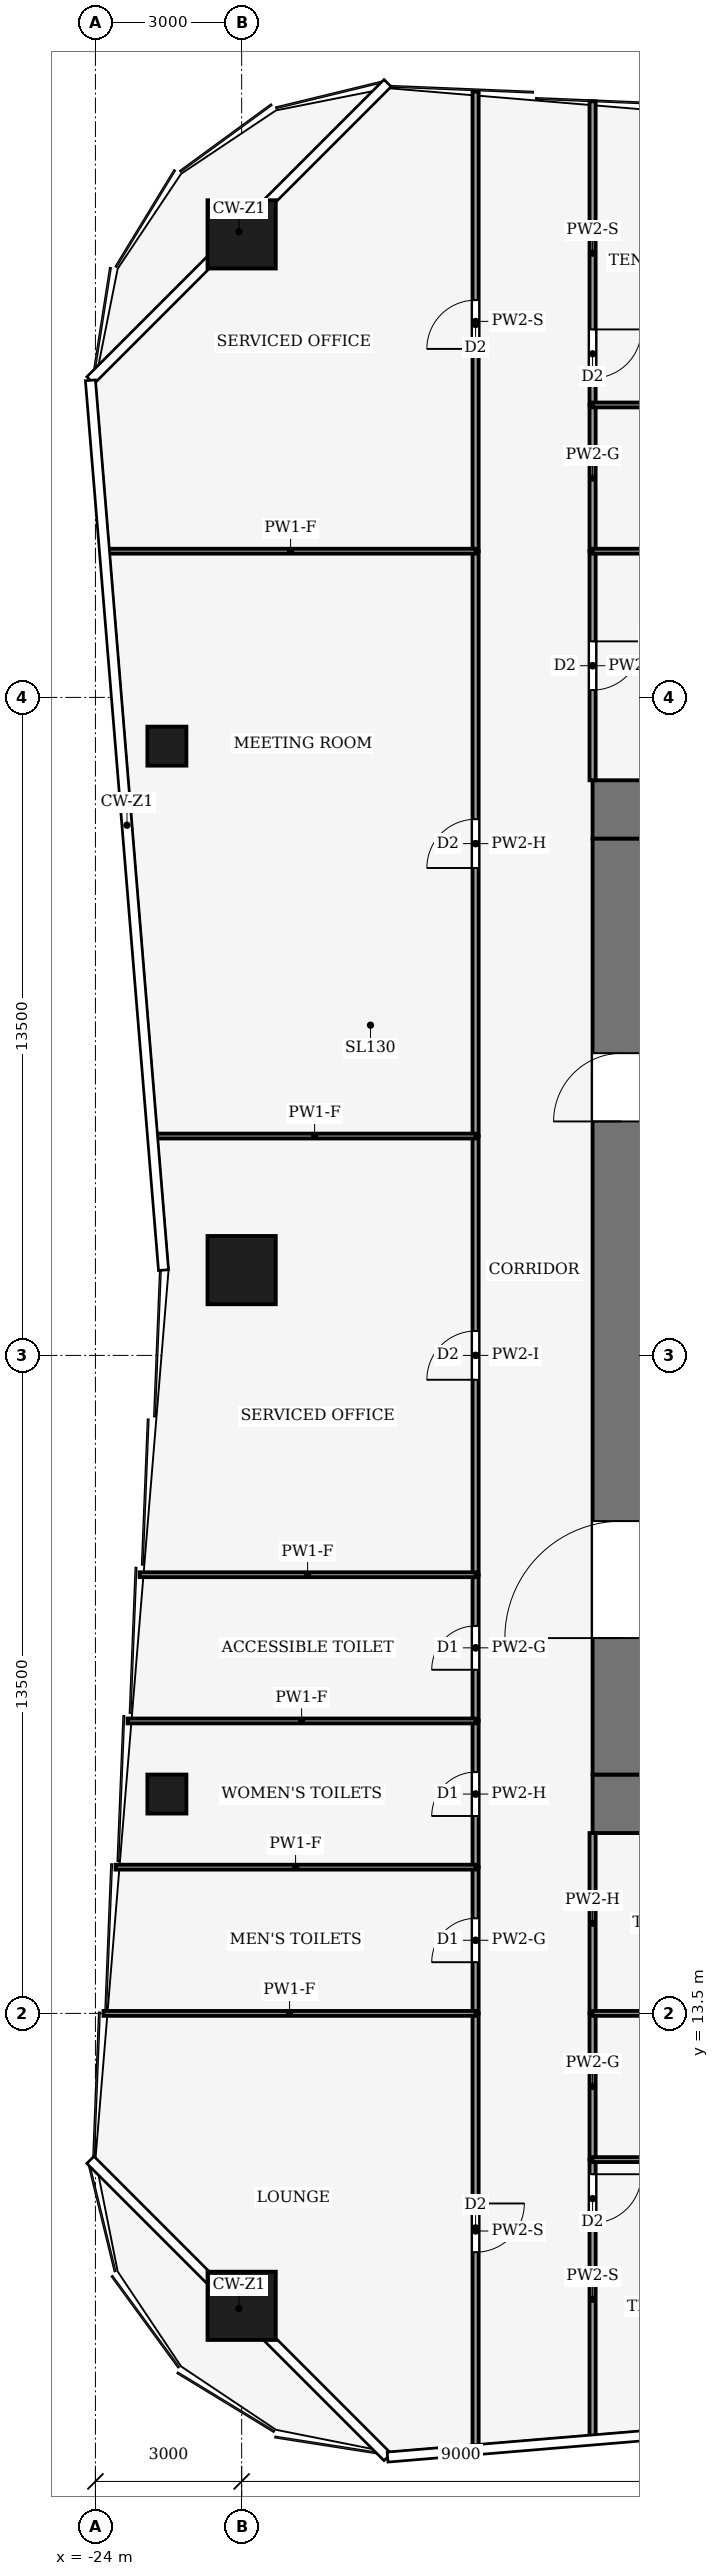
"""IFC4 building model, lengths in metres.
Left out: names, types, materials, properties, quantities, classifications, styles, units other than length and angle.
Written with IfcOpenShell. Run it as: python <this file> out.ifc"""

import sys

from ifc_helpers import new_model, si_unit, direction, frame, frame_2d, origin, origin_2d, place, context, subcontext, project, spatial, rectangle, hollow_rectangle, extrude, element, fill, save


model = new_model("IFC4")
c1 = context("Model", 3, precision=1e-05, world=origin(), true_north=direction((0.0, 1.0)))
c2 = subcontext(c1, "Body", "Model", "MODEL_VIEW")
j1 = project(units=[si_unit("LENGTHUNIT", "METRE"), si_unit("PLANEANGLEUNIT", "RADIAN")], contexts=[c1])
p1 = place(None, origin())
s1 = spatial("IfcSite", under=j1, at=p1, CompositionType="ELEMENT")
p2 = place(p1, origin())
s2 = spatial("IfcBuilding", under=s1, at=p2, CompositionType="ELEMENT")
p3 = place(p2, frame((0.0, 0.0, 98.0)))
s3 = spatial("IfcBuildingStorey", under=s2, at=p3, CompositionType="ELEMENT", Elevation=98.0)
for number, where, z_axis, x_axis in (
    (1, (-13.8, 17.8, -0.13), (0.0, 0.0, 1.0), (1.0, 0.0, 0.0)),
    (2, (-13.8, 38.2, -0.13), (0.0, 0.0, 1.0), (1.0, 0.0, 0.0)),
):
    element("IfcWall", number, at=place(p3, frame(where, z_axis=z_axis, x_axis=x_axis)), inside=s3, PredefinedType="SHEAR", context=c2, shape_type="SweptSolid", body=[
        extrude(rectangle(XDim=27.6, YDim=1.2, at=frame_2d((13.8, 0.0))), origin(), (0.0, 0.0, 1.0), 4.0),
    ])
p4 = place(p3, frame((-13.2, 18.4, -0.13), z_axis=(0.0, 0.0, 1.0), x_axis=(0.0, 1.0, 0.0)))
e3 = element("IfcWall", 3, at=p4, inside=s3, PredefinedType="SHEAR", context=c2, shape_type="SweptSolid", body=[
    extrude(rectangle(XDim=19.2, YDim=1.2, at=frame_2d((9.6, 0.0))), origin(), (0.0, 0.0, 1.0), 4.0),
])
p5 = place(p4, frame((2.8, 0.0, 0.13)))
e4 = element("IfcOpeningElement", 4, at=p5, cuts=e3, PredefinedType="OPENING", context=c2, shape_type="SweptSolid", body=[
    extrude(rectangle(XDim=2.4, YDim=2.4, at=frame_2d((1.2, 1.2))), frame((0.0, 0.61, 0.0), z_axis=(0.0, -1.0, 0.0), x_axis=(1.0, 0.0, 0.0)), (0.0, 0.0, 1.0), 1.22),
])
p6 = place(p4, frame((13.4, 0.0, 0.13)))
e5 = element("IfcOpeningElement", 5, at=p6, cuts=e3, PredefinedType="OPENING", context=c2, shape_type="SweptSolid", body=[
    extrude(rectangle(XDim=1.4, YDim=2.2, at=frame_2d((0.7, 1.1))), frame((0.0, 0.61, 0.0), z_axis=(0.0, -1.0, 0.0), x_axis=(1.0, 0.0, 0.0)), (0.0, 0.0, 1.0), 1.22),
])
for number, where, z_axis, x_axis in (
    (6, (-21.0, 50.0, 0.0), (0.0, 0.0, 1.0), (1.0, 0.0, 0.0)),
    (7, (-21.0, 7.5, 0.0), (0.0, 0.0, 1.0), (1.0, 0.0, 0.0)),
    (8, (-21.0, 28.75, 0.0), (0.0, 0.0, 1.0), (1.0, 0.0, 0.0)),
):
    element("IfcColumn", number, at=place(p3, frame(where, z_axis=z_axis, x_axis=x_axis)), inside=s3, PredefinedType="COLUMN", context=c2, shape_type="SweptSolid", body=[
        extrude(hollow_rectangle(XDim=1.4, YDim=1.4, WallThickness=0.08, at=origin_2d()), origin(), (0.0, 0.0, 1.0), 4.0),
    ])
for number, where, z_axis, x_axis in (
    (9, (-22.534, 18.0, 0.0), (0.0, 0.0, 1.0), (1.0, 0.0, 0.0)),
    (10, (-22.534, 39.5, 0.0), (0.0, 0.0, 1.0), (1.0, 0.0, 0.0)),
):
    element("IfcColumn", number, at=place(p3, frame(where, z_axis=z_axis, x_axis=x_axis)), inside=s3, PredefinedType="COLUMN", context=c2, shape_type="SweptSolid", body=[
        extrude(hollow_rectangle(XDim=0.8, YDim=0.8, WallThickness=0.04, at=origin_2d()), origin(), (0.0, 0.0, 1.0), 4.0),
    ])
p7 = place(p3, frame((-16.2, 13.5, 0.0), z_axis=(0.0, 0.0, 1.0), x_axis=(0.0, -1.0, 0.0)))
e11 = element("IfcWall", 11, at=p7, inside=s3, PredefinedType="PARTITIONING", context=c2, shape_type="SweptSolid", body=[
    extrude(rectangle(XDim=8.93, YDim=0.125, at=frame_2d((4.465, 0.0))), origin(), (0.0, 0.0, 1.0), 3.04),
])
p8 = place(p7, frame((3.9, 0.0, 0.0)))
e12 = element("IfcOpeningElement", 12, at=p8, cuts=e11, PredefinedType="OPENING", context=c2, shape_type="SweptSolid", body=[
    extrude(rectangle(XDim=1.0, YDim=2.1, at=frame_2d((0.5, 1.05))), frame((0.0, 0.073, 0.0), z_axis=(0.0, -1.0, 0.0), x_axis=(1.0, 0.0, 0.0)), (0.0, 0.0, 1.0), 0.145),
])
p9 = place(p3, frame((-16.2, 13.5, 0.0), z_axis=(0.0, 0.0, 1.0), x_axis=(0.0, 1.0, 0.0)))
e13 = element("IfcWall", 13, at=p9, inside=s3, PredefinedType="PARTITIONING", context=c2, shape_type="SweptSolid", body=[
    extrude(rectangle(XDim=3.0, YDim=0.125, at=frame_2d((1.5, 0.0))), origin(), (0.0, 0.0, 1.0), 3.87),
])
p10 = place(p9, frame((1.05, 0.0, 0.0)))
e14 = element("IfcOpeningElement", 14, at=p10, cuts=e13, PredefinedType="OPENING", context=c2, shape_type="SweptSolid", body=[
    extrude(rectangle(XDim=0.9, YDim=2.1, at=frame_2d((0.45, 1.05))), frame((0.0, 0.073, 0.0), z_axis=(0.0, -1.0, 0.0), x_axis=(1.0, 0.0, 0.0)), (0.0, 0.0, 1.0), 0.145),
])
p11 = place(p3, frame((-16.2, 16.5, 0.0), z_axis=(0.0, 0.0, 1.0), x_axis=(0.0, 1.0, 0.0)))
e15 = element("IfcWall", 15, at=p11, inside=s3, PredefinedType="PARTITIONING", context=c2, shape_type="SweptSolid", body=[
    extrude(rectangle(XDim=3.0, YDim=0.125, at=frame_2d((1.5, 0.0))), origin(), (0.0, 0.0, 1.0), 3.14),
])
p12 = place(p11, frame((1.05, 0.0, 0.0)))
e16 = element("IfcOpeningElement", 16, at=p12, cuts=e15, PredefinedType="OPENING", context=c2, shape_type="SweptSolid", body=[
    extrude(rectangle(XDim=0.9, YDim=2.1, at=frame_2d((0.45, 1.05))), frame((0.0, 0.073, 0.0), z_axis=(0.0, -1.0, 0.0), x_axis=(1.0, 0.0, 0.0)), (0.0, 0.0, 1.0), 0.145),
])
p13 = place(p3, frame((-16.2, 19.5, 0.0), z_axis=(0.0, 0.0, 1.0), x_axis=(0.0, 1.0, 0.0)))
e17 = element("IfcWall", 17, at=p13, inside=s3, PredefinedType="PARTITIONING", context=c2, shape_type="SweptSolid", body=[
    extrude(rectangle(XDim=3.0, YDim=0.125, at=frame_2d((1.5, 0.0))), origin(), (0.0, 0.0, 1.0), 3.87),
])
p14 = place(p13, frame((1.05, 0.0, 0.0)))
e18 = element("IfcOpeningElement", 18, at=p14, cuts=e17, PredefinedType="OPENING", context=c2, shape_type="SweptSolid", body=[
    extrude(rectangle(XDim=0.9, YDim=2.1, at=frame_2d((0.45, 1.05))), frame((0.0, 0.073, 0.0), z_axis=(0.0, -1.0, 0.0), x_axis=(1.0, 0.0, 0.0)), (0.0, 0.0, 1.0), 0.145),
])
p15 = place(p3, frame((-16.2, 22.5, 0.0), z_axis=(0.0, 0.0, 1.0), x_axis=(0.0, 1.0, 0.0)))
e19 = element("IfcWall", 19, at=p15, inside=s3, PredefinedType="PARTITIONING", context=c2, shape_type="SweptSolid", body=[
    extrude(rectangle(XDim=9.0, YDim=0.125, at=frame_2d((4.5, 0.0))), origin(), (0.0, 0.0, 1.0), 3.48),
])
p16 = place(p15, frame((4.0, 0.0, 0.0)))
e20 = element("IfcOpeningElement", 20, at=p16, cuts=e19, PredefinedType="OPENING", context=c2, shape_type="SweptSolid", body=[
    extrude(rectangle(XDim=1.0, YDim=2.1, at=frame_2d((0.5, 1.05))), frame((0.0, 0.073, 0.0), z_axis=(0.0, -1.0, 0.0), x_axis=(1.0, 0.0, 0.0)), (0.0, 0.0, 1.0), 0.145),
])
p17 = place(p3, frame((-16.2, 31.5, 0.0), z_axis=(0.0, 0.0, 1.0), x_axis=(0.0, 1.0, 0.0)))
e21 = element("IfcWall", 21, at=p17, inside=s3, PredefinedType="PARTITIONING", context=c2, shape_type="SweptSolid", body=[
    extrude(rectangle(XDim=12.0, YDim=0.125, at=frame_2d((6.0, 0.0))), origin(), (0.0, 0.0, 1.0), 3.14),
])
p18 = place(p17, frame((5.5, 0.0, 0.0)))
e22 = element("IfcOpeningElement", 22, at=p18, cuts=e21, PredefinedType="OPENING", context=c2, shape_type="SweptSolid", body=[
    extrude(rectangle(XDim=1.0, YDim=2.1, at=frame_2d((0.5, 1.05))), frame((0.0, 0.073, 0.0), z_axis=(0.0, -1.0, 0.0), x_axis=(1.0, 0.0, 0.0)), (0.0, 0.0, 1.0), 0.145),
])
p19 = place(p3, frame((-16.2, 43.5, 0.0), z_axis=(0.0, 0.0, 1.0), x_axis=(0.0, 1.0, 0.0)))
e23 = element("IfcWall", 23, at=p19, inside=s3, PredefinedType="PARTITIONING", context=c2, shape_type="SweptSolid", body=[
    extrude(rectangle(XDim=9.43, YDim=0.125, at=frame_2d((4.715, 0.0))), origin(), (0.0, 0.0, 1.0), 3.04),
])
p20 = place(p19, frame((4.15, 0.0, 0.0)))
e24 = element("IfcOpeningElement", 24, at=p20, cuts=e23, PredefinedType="OPENING", context=c2, shape_type="SweptSolid", body=[
    extrude(rectangle(XDim=1.0, YDim=2.1, at=frame_2d((0.5, 1.05))), frame((0.0, 0.073, 0.0), z_axis=(0.0, -1.0, 0.0), x_axis=(1.0, 0.0, 0.0)), (0.0, 0.0, 1.0), 0.145),
])
p21 = place(p3, frame((-13.8, 10.5, 0.0), z_axis=(0.0, 0.0, 1.0), x_axis=(0.0, -1.0, 0.0)))
e25 = element("IfcWall", 25, at=p21, inside=s3, PredefinedType="PARTITIONING", context=c2, shape_type="SweptSolid", body=[
    extrude(rectangle(XDim=5.73, YDim=0.125, at=frame_2d((2.865, 0.0))), origin(), (0.0, 0.0, 1.0), 3.04),
])
p22 = place(p21, frame((0.3, 0.0, 0.0)))
e26 = element("IfcOpeningElement", 26, at=p22, cuts=e25, PredefinedType="OPENING", context=c2, shape_type="SweptSolid", body=[
    extrude(rectangle(XDim=1.0, YDim=2.1, at=frame_2d((0.5, 1.05))), frame((0.0, 0.073, 0.0), z_axis=(0.0, -1.0, 0.0), x_axis=(1.0, 0.0, 0.0)), (0.0, 0.0, 1.0), 0.145),
])
p23 = place(p3, frame((-13.8, 10.5, 0.0), z_axis=(0.0, 0.0, 1.0), x_axis=(0.0, 1.0, 0.0)))
e27 = element("IfcWall", 27, at=p23, inside=s3, PredefinedType="PARTITIONING", context=c2, shape_type="SweptSolid", body=[
    extrude(rectangle(XDim=3.0, YDim=0.125, at=frame_2d((1.5, 0.0))), origin(), (0.0, 0.0, 1.0), 3.87),
])
p24 = place(p3, frame((-13.8, 13.5, 0.0), z_axis=(0.0, 0.0, 1.0), x_axis=(0.0, 1.0, 0.0)))
e28 = element("IfcWall", 28, at=p24, inside=s3, PredefinedType="PARTITIONING", context=c2, shape_type="SweptSolid", body=[
    extrude(rectangle(XDim=3.7, YDim=0.125, at=frame_2d((1.85, 0.0))), origin(), (0.0, 0.0, 1.0), 3.14),
])
p25 = place(p3, frame((-13.8, 43.5, 0.0), z_axis=(0.0, 0.0, 1.0), x_axis=(0.0, -1.0, 0.0)))
e29 = element("IfcWall", 29, at=p25, inside=s3, PredefinedType="PARTITIONING", context=c2, shape_type="SweptSolid", body=[
    extrude(rectangle(XDim=4.7, YDim=0.125, at=frame_2d((2.35, 0.0))), origin(), (0.0, 0.0, 1.0), 3.14),
])
p26 = place(p25, frame((1.85, 0.0, 0.0)))
e30 = element("IfcOpeningElement", 30, at=p26, cuts=e29, PredefinedType="OPENING", context=c2, shape_type="SweptSolid", body=[
    extrude(rectangle(XDim=1.0, YDim=2.1, at=frame_2d((0.5, 1.05))), frame((0.0, 0.073, 0.0), z_axis=(0.0, -1.0, 0.0), x_axis=(1.0, 0.0, 0.0)), (0.0, 0.0, 1.0), 0.145),
])
p27 = place(p3, frame((-13.8, 43.5, 0.0), z_axis=(0.0, 0.0, 1.0), x_axis=(0.0, 1.0, 0.0)))
e31 = element("IfcWall", 31, at=p27, inside=s3, PredefinedType="PARTITIONING", context=c2, shape_type="SweptSolid", body=[
    extrude(rectangle(XDim=3.0, YDim=0.125, at=frame_2d((1.5, 0.0))), origin(), (0.0, 0.0, 1.0), 3.87),
])
p28 = place(p3, frame((-13.8, 52.73, 0.0), z_axis=(0.0, 0.0, 1.0), x_axis=(0.0, -1.0, 0.0)))
e32 = element("IfcWall", 32, at=p28, inside=s3, PredefinedType="PARTITIONING", context=c2, shape_type="SweptSolid", body=[
    extrude(rectangle(XDim=6.23, YDim=0.125, at=frame_2d((3.115, 0.0))), origin(), (0.0, 0.0, 1.0), 3.04),
])
p29 = place(p28, frame((4.68, 0.0, 0.0)))
e33 = element("IfcOpeningElement", 33, at=p29, cuts=e32, PredefinedType="OPENING", context=c2, shape_type="SweptSolid", body=[
    extrude(rectangle(XDim=1.0, YDim=2.1, at=frame_2d((0.5, 1.05))), frame((0.0, 0.073, 0.0), z_axis=(0.0, -1.0, 0.0), x_axis=(1.0, 0.0, 0.0)), (0.0, 0.0, 1.0), 0.145),
])
p30 = place(p3, frame((-16.2, 13.5, 0.0), z_axis=(0.0, 0.0, 1.0), x_axis=(-1.0, 0.0, 0.0)))
e34 = element("IfcWall", 34, at=p30, inside=s3, PredefinedType="PARTITIONING", context=c2, shape_type="SweptSolid", body=[
    extrude(rectangle(XDim=7.634, YDim=0.1, at=frame_2d((3.817, 0.0))), origin(), (0.0, 0.0, 1.0), 3.04),
])
p31 = place(p3, frame((-16.2, 16.5, 0.0), z_axis=(0.0, 0.0, 1.0), x_axis=(-1.0, 0.0, 0.0)))
e35 = element("IfcWall", 35, at=p31, inside=s3, PredefinedType="PARTITIONING", context=c2, shape_type="SweptSolid", body=[
    extrude(rectangle(XDim=7.387, YDim=0.1, at=frame_2d((3.693, 0.0))), origin(), (0.0, 0.0, 1.0), 3.04),
])
p32 = place(p3, frame((-16.2, 19.5, 0.0), z_axis=(0.0, 0.0, 1.0), x_axis=(-1.0, 0.0, 0.0)))
e36 = element("IfcWall", 36, at=p32, inside=s3, PredefinedType="PARTITIONING", context=c2, shape_type="SweptSolid", body=[
    extrude(rectangle(XDim=7.14, YDim=0.1, at=frame_2d((3.57, 0.0))), origin(), (0.0, 0.0, 1.0), 3.04),
])
p33 = place(p3, frame((-16.2, 22.5, 0.0), z_axis=(0.0, 0.0, 1.0), x_axis=(-1.0, 0.0, 0.0)))
e37 = element("IfcWall", 37, at=p33, inside=s3, PredefinedType="PARTITIONING", context=c2, shape_type="SweptSolid", body=[
    extrude(rectangle(XDim=6.894, YDim=0.1, at=frame_2d((3.447, 0.0))), origin(), (0.0, 0.0, 1.0), 3.04),
])
p34 = place(p3, frame((-16.2, 31.5, 0.0), z_axis=(0.0, 0.0, 1.0), x_axis=(-1.0, 0.0, 0.0)))
e38 = element("IfcWall", 38, at=p34, inside=s3, PredefinedType="PARTITIONING", context=c2, shape_type="SweptSolid", body=[
    extrude(rectangle(XDim=6.606, YDim=0.1, at=frame_2d((3.303, 0.0))), origin(), (0.0, 0.0, 1.0), 3.04),
])
p35 = place(p3, frame((-16.2, 43.5, 0.0), z_axis=(0.0, 0.0, 1.0), x_axis=(-1.0, 0.0, 0.0)))
e39 = element("IfcWall", 39, at=p35, inside=s3, PredefinedType="PARTITIONING", context=c2, shape_type="SweptSolid", body=[
    extrude(rectangle(XDim=7.592, YDim=0.1, at=frame_2d((3.796, 0.0))), origin(), (0.0, 0.0, 1.0), 3.04),
])
p36 = place(p3, frame((-13.8, 10.5, 0.0), z_axis=(0.0, 0.0, 1.0), x_axis=(1.0, 0.0, 0.0)))
e40 = element("IfcWall", 40, at=p36, inside=s3, PredefinedType="PARTITIONING", context=c2, shape_type="SweptSolid", body=[
    extrude(rectangle(XDim=6.3, YDim=0.1, at=frame_2d((3.15, 0.0))), origin(), (0.0, 0.0, 1.0), 3.39),
])
p37 = place(p36, frame((2.65, 0.0, 0.0)))
e41 = element("IfcOpeningElement", 41, at=p37, cuts=e40, PredefinedType="OPENING", context=c2, shape_type="SweptSolid", body=[
    extrude(rectangle(XDim=1.0, YDim=2.1, at=frame_2d((0.5, 1.05))), frame((0.0, 0.06, 0.0), z_axis=(0.0, -1.0, 0.0), x_axis=(1.0, 0.0, 0.0)), (0.0, 0.0, 1.0), 0.12),
])
p38 = place(p3, frame((-13.8, 13.5, 0.0), z_axis=(0.0, 0.0, 1.0), x_axis=(1.0, 0.0, 0.0)))
e42 = element("IfcWall", 42, at=p38, inside=s3, PredefinedType="PARTITIONING", context=c2, shape_type="SweptSolid", body=[
    extrude(rectangle(XDim=6.3, YDim=0.1, at=frame_2d((3.15, 0.0))), origin(), (0.0, 0.0, 1.0), 3.39),
])
p39 = place(p38, frame((2.65, 0.0, 0.0)))
e43 = element("IfcOpeningElement", 43, at=p39, cuts=e42, PredefinedType="OPENING", context=c2, shape_type="SweptSolid", body=[
    extrude(rectangle(XDim=1.0, YDim=2.1, at=frame_2d((0.5, 1.05))), frame((0.0, 0.06, 0.0), z_axis=(0.0, -1.0, 0.0), x_axis=(1.0, 0.0, 0.0)), (0.0, 0.0, 1.0), 0.12),
])
p40 = place(p3, frame((-13.8, 43.5, 0.0), z_axis=(0.0, 0.0, 1.0), x_axis=(1.0, 0.0, 0.0)))
e44 = element("IfcWall", 44, at=p40, inside=s3, PredefinedType="PARTITIONING", context=c2, shape_type="SweptSolid", body=[
    extrude(rectangle(XDim=6.3, YDim=0.1, at=frame_2d((3.15, 0.0))), origin(), (0.0, 0.0, 1.0), 3.39),
])
p41 = place(p40, frame((2.65, 0.0, 0.0)))
e45 = element("IfcOpeningElement", 45, at=p41, cuts=e44, PredefinedType="OPENING", context=c2, shape_type="SweptSolid", body=[
    extrude(rectangle(XDim=1.0, YDim=2.1, at=frame_2d((0.5, 1.05))), frame((0.0, 0.06, 0.0), z_axis=(0.0, -1.0, 0.0), x_axis=(1.0, 0.0, 0.0)), (0.0, 0.0, 1.0), 0.12),
])
p42 = place(p3, frame((-7.5, 46.5, 0.0), z_axis=(0.0, 0.0, 1.0), x_axis=(-1.0, 0.0, 0.0)))
e46 = element("IfcWall", 46, at=p42, inside=s3, PredefinedType="PARTITIONING", context=c2, shape_type="SweptSolid", body=[
    extrude(rectangle(XDim=6.3, YDim=0.1, at=frame_2d((3.15, 0.0))), origin(), (0.0, 0.0, 1.0), 3.39),
])
p43 = place(p5, origin())
e47 = element("IfcDoor", 47, at=p43, inside=s3, OperationType="DOUBLE_DOOR_SINGLE_SWING", PredefinedType="DOOR", context=c2, shape_type="SweptSolid", body=[
    extrude(rectangle(XDim=2.4, YDim=2.4, at=frame_2d((1.2, 1.2))), frame((0.0, 0.025, 0.0), z_axis=(0.0, -1.0, 0.0), x_axis=(1.0, 0.0, 0.0)), (0.0, 0.0, 1.0), 0.05),
])
fill(e4, e47)
p44 = place(p6, origin())
e48 = element("IfcDoor", 48, at=p44, inside=s3, OperationType="SINGLE_SWING_RIGHT", PredefinedType="DOOR", context=c2, shape_type="SweptSolid", body=[
    extrude(rectangle(XDim=1.4, YDim=2.2, at=frame_2d((0.7, 1.1))), frame((0.0, 0.025, 0.0), z_axis=(0.0, -1.0, 0.0), x_axis=(1.0, 0.0, 0.0)), (0.0, 0.0, 1.0), 0.05),
])
fill(e5, e48)
p45 = place(p8, origin())
e49 = element("IfcDoor", 49, at=p45, inside=s3, OperationType="SINGLE_SWING_LEFT", PredefinedType="DOOR", context=c2, shape_type="SweptSolid", body=[
    extrude(rectangle(XDim=1.0, YDim=2.1, at=frame_2d((0.5, 1.05))), frame((0.0, 0.025, 0.0), z_axis=(0.0, -1.0, 0.0), x_axis=(1.0, 0.0, 0.0)), (0.0, 0.0, 1.0), 0.05),
])
fill(e12, e49)
p46 = place(p10, origin())
e50 = element("IfcDoor", 50, at=p46, inside=s3, OperationType="SINGLE_SWING_RIGHT", PredefinedType="DOOR", context=c2, shape_type="SweptSolid", body=[
    extrude(rectangle(XDim=0.9, YDim=2.1, at=frame_2d((0.45, 1.05))), frame((0.0, 0.025, 0.0), z_axis=(0.0, -1.0, 0.0), x_axis=(1.0, 0.0, 0.0)), (0.0, 0.0, 1.0), 0.05),
])
fill(e14, e50)
p47 = place(p12, origin())
e51 = element("IfcDoor", 51, at=p47, inside=s3, OperationType="SINGLE_SWING_LEFT", PredefinedType="DOOR", context=c2, shape_type="SweptSolid", body=[
    extrude(rectangle(XDim=0.9, YDim=2.1, at=frame_2d((0.45, 1.05))), frame((0.0, 0.025, 0.0), z_axis=(0.0, -1.0, 0.0), x_axis=(1.0, 0.0, 0.0)), (0.0, 0.0, 1.0), 0.05),
])
fill(e16, e51)
p48 = place(p14, origin())
e52 = element("IfcDoor", 52, at=p48, inside=s3, OperationType="SINGLE_SWING_RIGHT", PredefinedType="DOOR", context=c2, shape_type="SweptSolid", body=[
    extrude(rectangle(XDim=0.9, YDim=2.1, at=frame_2d((0.45, 1.05))), frame((0.0, 0.025, 0.0), z_axis=(0.0, -1.0, 0.0), x_axis=(1.0, 0.0, 0.0)), (0.0, 0.0, 1.0), 0.05),
])
fill(e18, e52)
p49 = place(p16, origin())
e53 = element("IfcDoor", 53, at=p49, inside=s3, OperationType="SINGLE_SWING_LEFT", PredefinedType="DOOR", context=c2, shape_type="SweptSolid", body=[
    extrude(rectangle(XDim=1.0, YDim=2.1, at=frame_2d((0.5, 1.05))), frame((0.0, 0.025, 0.0), z_axis=(0.0, -1.0, 0.0), x_axis=(1.0, 0.0, 0.0)), (0.0, 0.0, 1.0), 0.05),
])
fill(e20, e53)
p50 = place(p18, origin())
e54 = element("IfcDoor", 54, at=p50, inside=s3, OperationType="SINGLE_SWING_RIGHT", PredefinedType="DOOR", context=c2, shape_type="SweptSolid", body=[
    extrude(rectangle(XDim=1.0, YDim=2.1, at=frame_2d((0.5, 1.05))), frame((0.0, 0.025, 0.0), z_axis=(0.0, -1.0, 0.0), x_axis=(1.0, 0.0, 0.0)), (0.0, 0.0, 1.0), 0.05),
])
fill(e22, e54)
p51 = place(p20, origin())
e55 = element("IfcDoor", 55, at=p51, inside=s3, OperationType="SINGLE_SWING_LEFT", PredefinedType="DOOR", context=c2, shape_type="SweptSolid", body=[
    extrude(rectangle(XDim=1.0, YDim=2.1, at=frame_2d((0.5, 1.05))), frame((0.0, 0.025, 0.0), z_axis=(0.0, -1.0, 0.0), x_axis=(1.0, 0.0, 0.0)), (0.0, 0.0, 1.0), 0.05),
])
fill(e24, e55)
p52 = place(p22, origin())
e56 = element("IfcDoor", 56, at=p52, inside=s3, OperationType="SINGLE_SWING_LEFT", PredefinedType="DOOR", context=c2, shape_type="SweptSolid", body=[
    extrude(rectangle(XDim=1.0, YDim=2.1, at=frame_2d((0.5, 1.05))), frame((0.0, 0.025, 0.0), z_axis=(0.0, -1.0, 0.0), x_axis=(1.0, 0.0, 0.0)), (0.0, 0.0, 1.0), 0.05),
])
fill(e26, e56)
p53 = place(p26, origin())
e57 = element("IfcDoor", 57, at=p53, inside=s3, OperationType="SINGLE_SWING_LEFT", PredefinedType="DOOR", context=c2, shape_type="SweptSolid", body=[
    extrude(rectangle(XDim=1.0, YDim=2.1, at=frame_2d((0.5, 1.05))), frame((0.0, 0.025, 0.0), z_axis=(0.0, -1.0, 0.0), x_axis=(1.0, 0.0, 0.0)), (0.0, 0.0, 1.0), 0.05),
])
fill(e30, e57)
p54 = place(p29, origin())
e58 = element("IfcDoor", 58, at=p54, inside=s3, OperationType="SINGLE_SWING_RIGHT", PredefinedType="DOOR", context=c2, shape_type="SweptSolid", body=[
    extrude(rectangle(XDim=1.0, YDim=2.1, at=frame_2d((0.5, 1.05))), frame((0.0, 0.025, 0.0), z_axis=(0.0, -1.0, 0.0), x_axis=(1.0, 0.0, 0.0)), (0.0, 0.0, 1.0), 0.05),
])
fill(e33, e58)
save(model, sys.argv[1])
